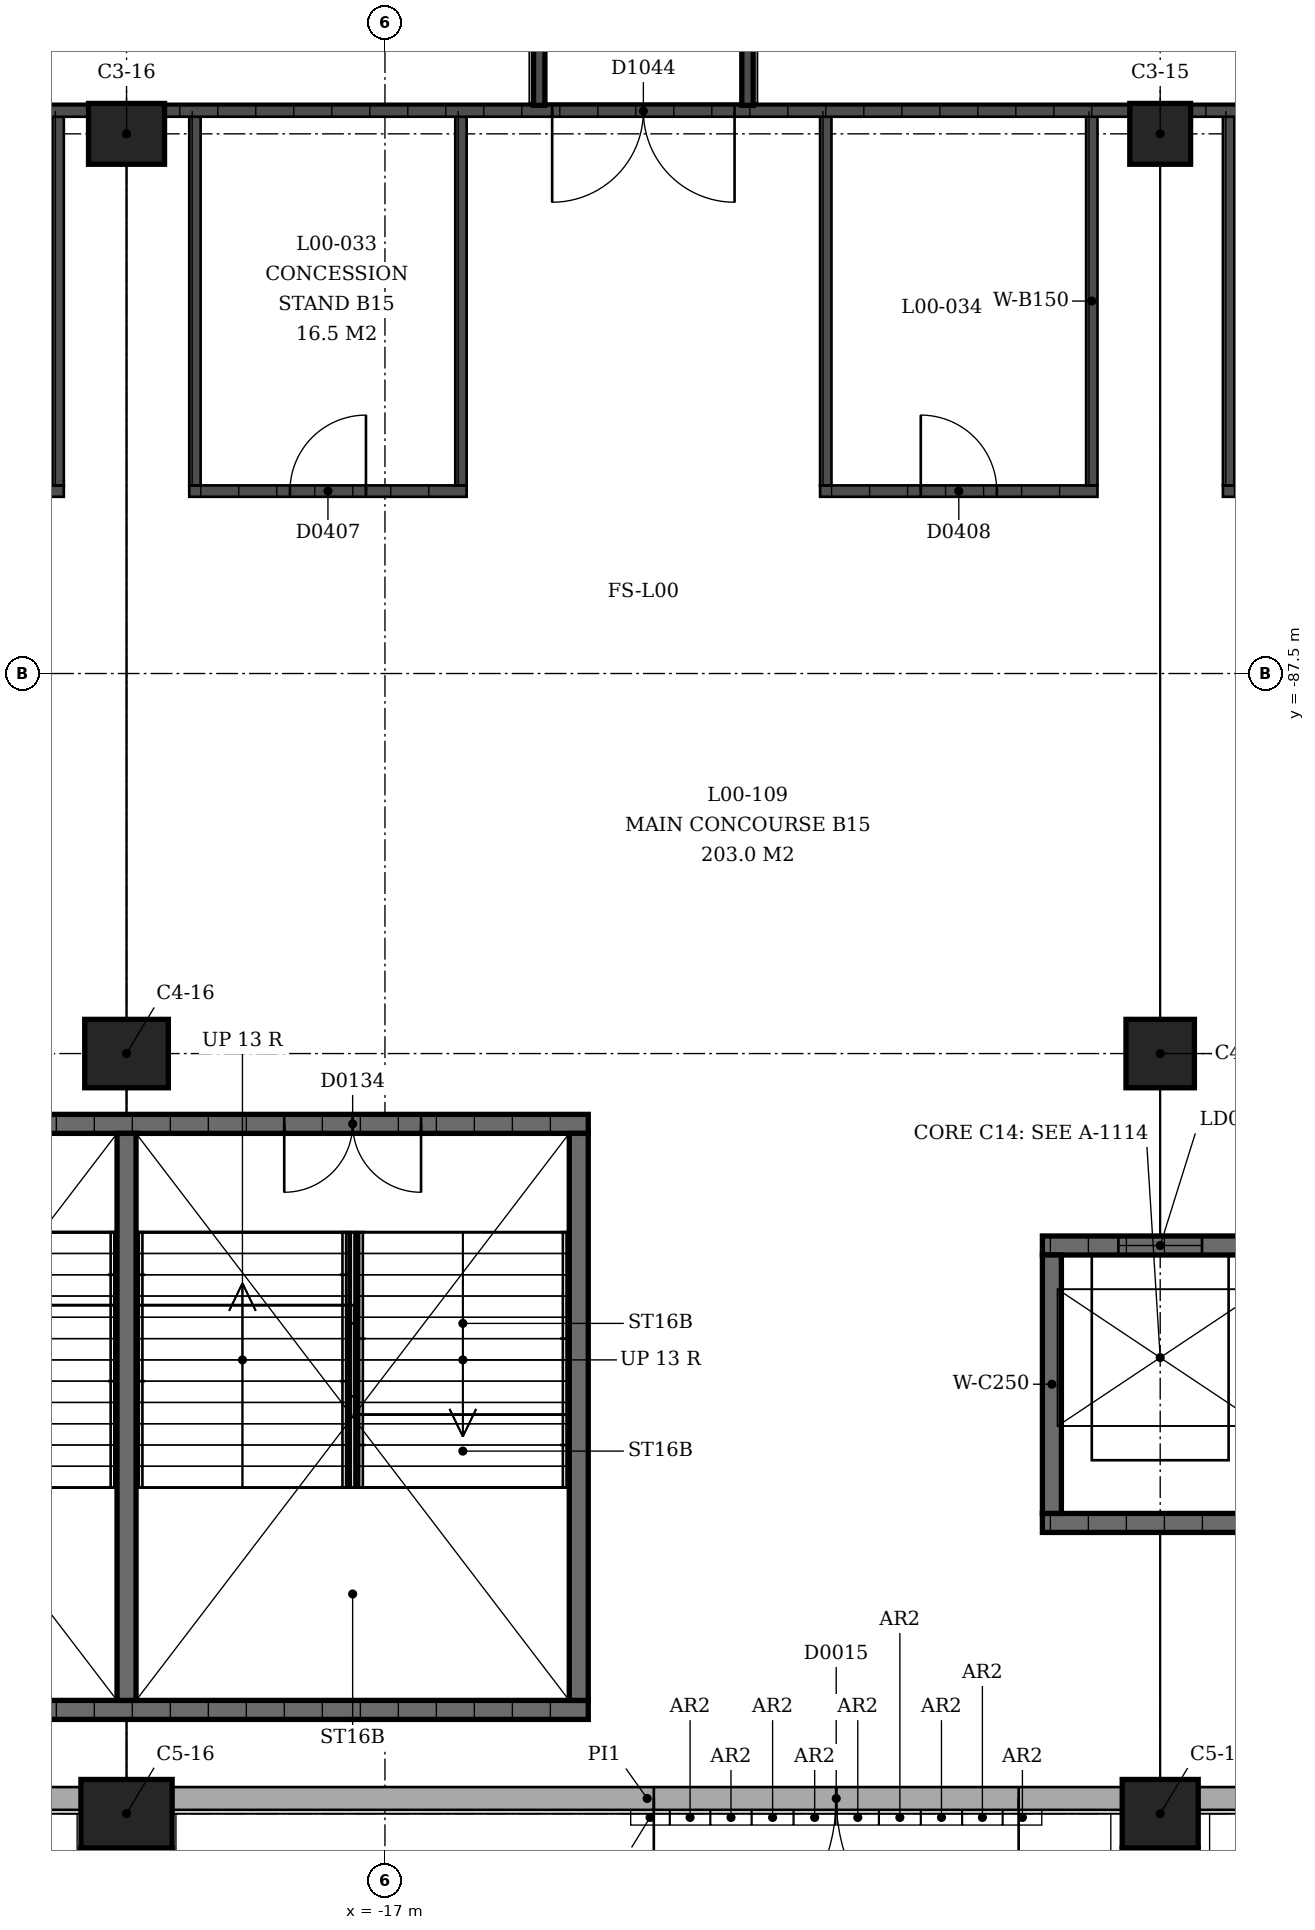
"""IFC4 building model, lengths in metres.
Left out: names, types, materials, properties, quantities, classifications, styles, units other than length and angle.
Written with IfcOpenShell. Run it as: python <this file> out.ifc"""

import sys

from ifc_helpers import new_model, si_unit, direction, frame, frame_2d, origin, origin_2d, place, context, subcontext, project, spatial, rectangle, extrude, element, fill, save


model = new_model("IFC4")
c1 = context("Model", 3, precision=1e-05, world=origin(), true_north=direction((0.0, 1.0)))
c2 = subcontext(c1, "Body", "Model", "MODEL_VIEW")
j1 = project(units=[si_unit("LENGTHUNIT", "METRE"), si_unit("PLANEANGLEUNIT", "RADIAN")], contexts=[c1])
p1 = place(None, origin())
s1 = spatial("IfcSite", under=j1, at=p1, CompositionType="ELEMENT")
p2 = place(p1, origin())
s2 = spatial("IfcBuilding", under=s1, at=p2, CompositionType="ELEMENT")
p3 = place(p2, origin())
s3 = spatial("IfcBuildingStorey", under=s2, at=p3, CompositionType="ELEMENT", Elevation=0.0)
p4 = place(p3, frame((-6.8, -80.4, 0.0), z_axis=(0.0, 0.0, 1.0), x_axis=(1.0, 0.0, 0.0)))
e1 = element("IfcColumn", 1, at=p4, inside=s3, PredefinedType="COLUMN", context=c2, shape_type="SweptSolid", body=[
    extrude(rectangle(XDim=0.8, YDim=0.8, at=origin_2d()), origin(), (0.0, 0.0, 1.0), 4.5),
])
p5 = place(p3, frame((-6.8, -92.5, 0.0), z_axis=(0.0, 0.0, 1.0), x_axis=(1.0, 0.0, 0.0)))
e2 = element("IfcColumn", 2, at=p5, inside=s3, PredefinedType="COLUMN", context=c2, shape_type="SweptSolid", body=[
    extrude(rectangle(XDim=0.9, YDim=0.9, at=origin_2d()), origin(), (0.0, 0.0, 1.0), 4.5),
])
p6 = place(p3, frame((-6.8, -102.5, 0.0), z_axis=(0.0, 0.0, 1.0), x_axis=(1.0, 0.0, 0.0)))
e3 = element("IfcColumn", 3, at=p6, inside=s3, PredefinedType="COLUMN", context=c2, shape_type="SweptSolid", body=[
    extrude(rectangle(XDim=1.0, YDim=0.9, at=origin_2d()), origin(), (0.0, 0.0, 1.0), 4.5),
])
p7 = place(p3, frame((-20.4, -80.4, 0.0), z_axis=(0.0, 0.0, 1.0), x_axis=(1.0, 0.0, 0.0)))
e4 = element("IfcColumn", 4, at=p7, inside=s3, PredefinedType="COLUMN", context=c2, shape_type="SweptSolid", body=[
    extrude(rectangle(XDim=1.0, YDim=0.8, at=origin_2d()), origin(), (0.0, 0.0, 1.0), 4.5),
])
p8 = place(p3, frame((-20.4, -92.5, 0.0), z_axis=(0.0, 0.0, 1.0), x_axis=(1.0, 0.0, 0.0)))
e5 = element("IfcColumn", 5, at=p8, inside=s3, PredefinedType="COLUMN", context=c2, shape_type="SweptSolid", body=[
    extrude(rectangle(XDim=1.1, YDim=0.9, at=origin_2d()), origin(), (0.0, 0.0, 1.0), 4.5),
])
p9 = place(p3, frame((-20.4, -102.5, 0.0), z_axis=(0.0, 0.0, 1.0), x_axis=(1.0, 0.0, 0.0)))
e6 = element("IfcColumn", 6, at=p9, inside=s3, PredefinedType="COLUMN", context=c2, shape_type="SweptSolid", body=[
    extrude(rectangle(XDim=1.2, YDim=0.9, at=origin_2d()), origin(), (0.0, 0.0, 1.0), 4.5),
])
p10 = place(p3, frame((6.2, -102.3, 0.0), z_axis=(0.0, 0.0, 1.0), x_axis=(-1.0, 0.0, 0.0)))
e7 = element("IfcWall", 7, at=p10, inside=s3, PredefinedType="SOLIDWALL", context=c2, shape_type="SweptSolid", body=[
    extrude(rectangle(XDim=12.5, YDim=0.3, at=frame_2d((6.25, 0.0))), origin(), (0.0, 0.0, 1.0), 3.09),
])
p11 = place(p10, frame((7.238, 0.0, 0.0)))
e8 = element("IfcOpeningElement", 8, at=p11, cuts=e7, PredefinedType="OPENING", context=c2, shape_type="SweptSolid", body=[
    extrude(rectangle(XDim=3.0, YDim=2.4, at=frame_2d((1.5, 1.2))), frame((0.0, 0.16, 0.0), z_axis=(0.0, -1.0, 0.0), x_axis=(1.0, 0.0, 0.0)), (0.0, 0.0, 1.0), 0.32),
])
p12 = place(p3, frame((-7.3, -102.3, 0.0), z_axis=(0.0, 0.0, 1.0), x_axis=(-1.0, 0.0, 0.0)))
e9 = element("IfcWall", 9, at=p12, inside=s3, PredefinedType="SOLIDWALL", context=c2, shape_type="SweptSolid", body=[
    extrude(rectangle(XDim=12.5, YDim=0.3, at=frame_2d((6.25, 0.0))), origin(), (0.0, 0.0, 1.0), 3.09),
])
p13 = place(p12, frame((1.363, 0.0, 0.0)))
e10 = element("IfcOpeningElement", 10, at=p13, cuts=e9, PredefinedType="OPENING", context=c2, shape_type="SweptSolid", body=[
    extrude(rectangle(XDim=4.8, YDim=2.4, at=frame_2d((2.4, 1.2))), frame((0.0, 0.16, 0.0), z_axis=(0.0, -1.0, 0.0), x_axis=(1.0, 0.0, 0.0)), (0.0, 0.0, 1.0), 0.32),
])
p14 = place(p3, frame((-21.0, -102.3, 0.0), z_axis=(0.0, 0.0, 1.0), x_axis=(-1.0, 0.0, 0.0)))
e11 = element("IfcWall", 11, at=p14, inside=s3, PredefinedType="SOLIDWALL", context=c2, shape_type="SweptSolid", body=[
    extrude(rectangle(XDim=12.5, YDim=0.3, at=frame_2d((6.25, 0.0))), origin(), (0.0, 0.0, 1.0), 3.09),
])
p15 = place(p14, frame((7.238, 0.0, 0.0)))
e12 = element("IfcOpeningElement", 12, at=p15, cuts=e11, PredefinedType="OPENING", context=c2, shape_type="SweptSolid", body=[
    extrude(rectangle(XDim=3.0, YDim=2.4, at=frame_2d((1.5, 1.2))), frame((0.0, 0.16, 0.0), z_axis=(0.0, -1.0, 0.0), x_axis=(1.0, 0.0, 0.0)), (0.0, 0.0, 1.0), 0.32),
])
p16 = place(p3, frame((-26.475, -93.425, 0.0), z_axis=(0.0, 0.0, 1.0), x_axis=(1.0, 0.0, 0.0)))
e13 = element("IfcWall", 13, at=p16, inside=s3, PredefinedType="SHEAR", context=c2, shape_type="SweptSolid", body=[
    extrude(rectangle(XDim=12.15, YDim=0.25, at=frame_2d((6.075, 0.0))), origin(), (0.0, 0.0, 1.0), 4.09),
])
p17 = place(p16, frame((2.2, 0.0, 0.0)))
e14 = element("IfcOpeningElement", 14, at=p17, cuts=e13, PredefinedType="OPENING", context=c2, shape_type="SweptSolid", body=[
    extrude(rectangle(XDim=1.8, YDim=2.1, at=frame_2d((0.9, 1.05))), frame((0.0, 0.125, 0.0), z_axis=(0.0, -1.0, 0.0), x_axis=(1.0, 0.0, 0.0)), (0.0, 0.0, 1.0), 0.25),
])
p18 = place(p16, frame((8.15, 0.0, 0.0)))
e15 = element("IfcOpeningElement", 15, at=p18, cuts=e13, PredefinedType="OPENING", context=c2, shape_type="SweptSolid", body=[
    extrude(rectangle(XDim=1.8, YDim=2.1, at=frame_2d((0.9, 1.05))), frame((0.0, 0.125, 0.0), z_axis=(0.0, -1.0, 0.0), x_axis=(1.0, 0.0, 0.0)), (0.0, 0.0, 1.0), 0.25),
])
p19 = place(p3, frame((-26.475, -101.135, 0.0), z_axis=(0.0, 0.0, 1.0), x_axis=(1.0, 0.0, 0.0)))
e16 = element("IfcWall", 16, at=p19, inside=s3, PredefinedType="SHEAR", context=c2, shape_type="SweptSolid", body=[
    extrude(rectangle(XDim=12.15, YDim=0.25, at=frame_2d((6.075, 0.0))), origin(), (0.0, 0.0, 1.0), 4.09),
])
for number, where, z_axis, x_axis in (
    (17, (-14.45, -93.55, 0.0), (0.0, 0.0, 1.0), (0.0, -1.0, 0.0)),
    (18, (-20.4, -93.55, 0.0), (0.0, 0.0, 1.0), (0.0, -1.0, 0.0)),
):
    element("IfcWall", number, at=place(p3, frame(where, z_axis=z_axis, x_axis=x_axis)), inside=s3, PredefinedType="SHEAR", context=c2, shape_type="SweptSolid", body=[
        extrude(rectangle(XDim=7.46, YDim=0.25, at=frame_2d((3.73, 0.0))), origin(), (0.0, 0.0, 1.0), 4.09),
    ])
p20 = place(p3, frame((-8.35, -95.025, 0.0), z_axis=(0.0, 0.0, 1.0), x_axis=(1.0, 0.0, 0.0)))
e19 = element("IfcWall", 19, at=p20, inside=s3, PredefinedType="SHEAR", context=c2, shape_type="SweptSolid", body=[
    extrude(rectangle(XDim=3.1, YDim=0.25, at=frame_2d((1.55, 0.0))), origin(), (0.0, 0.0, 1.0), 4.09),
])
p21 = place(p20, frame((1.0, 0.0, 0.0)))
e20 = element("IfcOpeningElement", 20, at=p21, cuts=e19, PredefinedType="OPENING", context=c2, shape_type="SweptSolid", body=[
    extrude(rectangle(XDim=1.1, YDim=2.1, at=frame_2d((0.55, 1.05))), frame((0.0, 0.125, 0.0), z_axis=(0.0, -1.0, 0.0), x_axis=(1.0, 0.0, 0.0)), (0.0, 0.0, 1.0), 0.25),
])
p22 = place(p3, frame((-8.35, -98.675, 0.0), z_axis=(0.0, 0.0, 1.0), x_axis=(1.0, 0.0, 0.0)))
e21 = element("IfcWall", 21, at=p22, inside=s3, PredefinedType="SHEAR", context=c2, shape_type="SweptSolid", body=[
    extrude(rectangle(XDim=3.1, YDim=0.25, at=frame_2d((1.55, 0.0))), origin(), (0.0, 0.0, 1.0), 4.09),
])
p23 = place(p3, frame((-8.225, -95.15, 0.0), z_axis=(0.0, 0.0, 1.0), x_axis=(0.0, -1.0, 0.0)))
e22 = element("IfcWall", 22, at=p23, inside=s3, PredefinedType="SHEAR", context=c2, shape_type="SweptSolid", body=[
    extrude(rectangle(XDim=3.4, YDim=0.25, at=frame_2d((1.7, 0.0))), origin(), (0.0, 0.0, 1.0), 4.09),
])
p24 = place(p3, frame((-2.325, -85.1, 0.0), z_axis=(0.0, 0.0, 1.0), x_axis=(-1.0, 0.0, 0.0)))
e23 = element("IfcWall", 23, at=p24, inside=s3, PredefinedType="SOLIDWALL", context=c2, shape_type="SweptSolid", body=[
    extrude(rectangle(XDim=3.65, YDim=0.15, at=frame_2d((1.825, 0.0))), origin(), (0.0, 0.0, 1.0), 3.0),
])
p25 = place(p24, frame((1.325, 0.0, 0.0)))
e24 = element("IfcOpeningElement", 24, at=p25, cuts=e23, PredefinedType="OPENING", context=c2, shape_type="SweptSolid", body=[
    extrude(rectangle(XDim=1.0, YDim=2.1, at=frame_2d((0.5, 1.05))), frame((0.0, 0.075, 0.0), z_axis=(0.0, -1.0, 0.0), x_axis=(1.0, 0.0, 0.0)), (0.0, 0.0, 1.0), 0.15),
])
p26 = place(p3, frame((-5.9, -80.1, 0.0), z_axis=(0.0, 0.0, 1.0), x_axis=(0.0, -1.0, 0.0)))
e25 = element("IfcWall", 25, at=p26, inside=s3, PredefinedType="SOLIDWALL", context=c2, shape_type="SweptSolid", body=[
    extrude(rectangle(XDim=4.925, YDim=0.15, at=frame_2d((2.462, 0.0))), origin(), (0.0, 0.0, 1.0), 3.0),
])
p27 = place(p3, frame((-19.575, -85.1, 0.0), z_axis=(0.0, 0.0, 1.0), x_axis=(1.0, 0.0, 0.0)))
e26 = element("IfcWall", 26, at=p27, inside=s3, PredefinedType="SOLIDWALL", context=c2, shape_type="SweptSolid", body=[
    extrude(rectangle(XDim=3.65, YDim=0.15, at=frame_2d((1.825, 0.0))), origin(), (0.0, 0.0, 1.0), 3.0),
])
p28 = place(p27, frame((1.325, 0.0, 0.0)))
e27 = element("IfcOpeningElement", 27, at=p28, cuts=e26, PredefinedType="OPENING", context=c2, shape_type="SweptSolid", body=[
    extrude(rectangle(XDim=1.0, YDim=2.1, at=frame_2d((0.5, 1.05))), frame((0.0, 0.075, 0.0), z_axis=(0.0, -1.0, 0.0), x_axis=(1.0, 0.0, 0.0)), (0.0, 0.0, 1.0), 0.15),
])
for number, where, z_axis, x_axis in (
    (28, (-19.5, -80.1, 0.0), (0.0, 0.0, 1.0), (0.0, -1.0, 0.0)),
    (29, (-16.0, -80.1, 0.0), (0.0, 0.0, 1.0), (0.0, -1.0, 0.0)),
):
    element("IfcWall", number, at=place(p3, frame(where, z_axis=z_axis, x_axis=x_axis)), inside=s3, PredefinedType="SOLIDWALL", context=c2, shape_type="SweptSolid", body=[
        extrude(rectangle(XDim=4.925, YDim=0.15, at=frame_2d((2.462, 0.0))), origin(), (0.0, 0.0, 1.0), 3.0),
    ])
p29 = place(p3, frame((-11.275, -85.1, 0.0), z_axis=(0.0, 0.0, 1.0), x_axis=(1.0, 0.0, 0.0)))
e30 = element("IfcWall", 30, at=p29, inside=s3, PredefinedType="SOLIDWALL", context=c2, shape_type="SweptSolid", body=[
    extrude(rectangle(XDim=3.65, YDim=0.15, at=frame_2d((1.825, 0.0))), origin(), (0.0, 0.0, 1.0), 3.0),
])
p30 = place(p29, frame((1.325, 0.0, 0.0)))
e31 = element("IfcOpeningElement", 31, at=p30, cuts=e30, PredefinedType="OPENING", context=c2, shape_type="SweptSolid", body=[
    extrude(rectangle(XDim=1.0, YDim=2.1, at=frame_2d((0.5, 1.05))), frame((0.0, 0.075, 0.0), z_axis=(0.0, -1.0, 0.0), x_axis=(1.0, 0.0, 0.0)), (0.0, 0.0, 1.0), 0.15),
])
for number, where, z_axis, x_axis in (
    (32, (-11.2, -80.1, 0.0), (0.0, 0.0, 1.0), (0.0, -1.0, 0.0)),
    (33, (-7.7, -80.1, 0.0), (0.0, 0.0, 1.0), (0.0, -1.0, 0.0)),
):
    element("IfcWall", number, at=place(p3, frame(where, z_axis=z_axis, x_axis=x_axis)), inside=s3, PredefinedType="SOLIDWALL", context=c2, shape_type="SweptSolid", body=[
        extrude(rectangle(XDim=4.925, YDim=0.15, at=frame_2d((2.462, 0.0))), origin(), (0.0, 0.0, 1.0), 3.0),
    ])
p31 = place(p3, frame((-21.225, -85.1, 0.0), z_axis=(0.0, 0.0, 1.0), x_axis=(-1.0, 0.0, 0.0)))
e34 = element("IfcWall", 34, at=p31, inside=s3, PredefinedType="SOLIDWALL", context=c2, shape_type="SweptSolid", body=[
    extrude(rectangle(XDim=3.65, YDim=0.15, at=frame_2d((1.825, 0.0))), origin(), (0.0, 0.0, 1.0), 3.0),
])
p32 = place(p31, frame((1.325, 0.0, 0.0)))
e35 = element("IfcOpeningElement", 35, at=p32, cuts=e34, PredefinedType="OPENING", context=c2, shape_type="SweptSolid", body=[
    extrude(rectangle(XDim=1.0, YDim=2.1, at=frame_2d((0.5, 1.05))), frame((0.0, 0.075, 0.0), z_axis=(0.0, -1.0, 0.0), x_axis=(1.0, 0.0, 0.0)), (0.0, 0.0, 1.0), 0.15),
])
p33 = place(p3, frame((-21.3, -80.1, 0.0), z_axis=(0.0, 0.0, 1.0), x_axis=(0.0, -1.0, 0.0)))
e36 = element("IfcWall", 36, at=p33, inside=s3, PredefinedType="SOLIDWALL", context=c2, shape_type="SweptSolid", body=[
    extrude(rectangle(XDim=4.925, YDim=0.15, at=frame_2d((2.462, 0.0))), origin(), (0.0, 0.0, 1.0), 3.0),
])
p34 = place(p3, frame((6.3, -80.1, 0.0), z_axis=(0.0, 0.0, 1.0), x_axis=(-1.0, 0.0, 0.0)))
e37 = element("IfcWall", 37, at=p34, inside=s3, PredefinedType="SOLIDWALL", context=c2, shape_type="SweptSolid", body=[
    extrude(rectangle(XDim=12.7, YDim=0.15, at=frame_2d((6.35, 0.0))), origin(), (0.0, 0.0, 1.0), 3.0),
])
p35 = place(p3, frame((-7.2, -80.1, 0.0), z_axis=(0.0, 0.0, 1.0), x_axis=(-1.0, 0.0, 0.0)))
e38 = element("IfcWall", 38, at=p35, inside=s3, PredefinedType="SOLIDWALL", context=c2, shape_type="SweptSolid", body=[
    extrude(rectangle(XDim=12.7, YDim=0.15, at=frame_2d((6.35, 0.0))), origin(), (0.0, 0.0, 1.0), 3.0),
])
p36 = place(p35, frame((5.2, 0.0, 0.0)))
e39 = element("IfcOpeningElement", 39, at=p36, cuts=e38, PredefinedType="OPENING", context=c2, shape_type="SweptSolid", body=[
    extrude(rectangle(XDim=2.4, YDim=2.4, at=frame_2d((1.2, 1.2))), frame((0.0, 0.075, 0.0), z_axis=(0.0, -1.0, 0.0), x_axis=(1.0, 0.0, 0.0)), (0.0, 0.0, 1.0), 0.15),
])
p37 = place(p3, frame((-20.9, -80.1, 0.0), z_axis=(0.0, 0.0, 1.0), x_axis=(-1.0, 0.0, 0.0)))
e40 = element("IfcWall", 40, at=p37, inside=s3, PredefinedType="SOLIDWALL", context=c2, shape_type="SweptSolid", body=[
    extrude(rectangle(XDim=12.7, YDim=0.15, at=frame_2d((6.35, 0.0))), origin(), (0.0, 0.0, 1.0), 3.0),
])
for number, where, z_axis, x_axis in (
    (41, (-14.97, -75.3, 0.0), (0.0, 0.0, 1.0), (0.0, -1.0, 0.0)),
    (42, (-12.23, -75.3, 0.0), (0.0, 0.0, 1.0), (0.0, -1.0, 0.0)),
):
    element("IfcWall", number, at=place(p3, frame(where, z_axis=z_axis, x_axis=x_axis)), inside=s3, PredefinedType="SOLIDWALL", context=c2, shape_type="SweptSolid", body=[
        extrude(rectangle(XDim=4.725, YDim=0.15, at=frame_2d((2.362, 0.0))), origin(), (0.0, 0.0, 1.0), 2.75),
    ])
p38 = place(p13, origin())
e43 = element("IfcDoor", 43, at=p38, inside=s3, OperationType="DOUBLE_DOOR_SINGLE_SWING", PredefinedType="DOOR", context=c2, shape_type="SweptSolid", body=[
    extrude(rectangle(XDim=4.8, YDim=2.4, at=frame_2d((2.4, 1.2))), frame((0.0, 0.025, 0.0), z_axis=(0.0, -1.0, 0.0), x_axis=(1.0, 0.0, 0.0)), (0.0, 0.0, 1.0), 0.05),
])
fill(e10, e43)
p39 = place(p18, origin())
e44 = element("IfcDoor", 44, at=p39, inside=s3, OperationType="DOUBLE_DOOR_SINGLE_SWING", PredefinedType="DOOR", context=c2, shape_type="SweptSolid", body=[
    extrude(rectangle(XDim=1.8, YDim=2.1, at=frame_2d((0.9, 1.05))), frame((0.0, 0.025, 0.0), z_axis=(0.0, -1.0, 0.0), x_axis=(1.0, 0.0, 0.0)), (0.0, 0.0, 1.0), 0.05),
])
fill(e15, e44)
p40 = place(p21, origin())
e45 = element("IfcDoor", 45, at=p40, inside=s3, OperationType="SLIDING_TO_LEFT", PredefinedType="DOOR", context=c2, shape_type="SweptSolid", body=[
    extrude(rectangle(XDim=1.1, YDim=2.1, at=frame_2d((0.55, 1.05))), frame((0.0, 0.025, 0.0), z_axis=(0.0, -1.0, 0.0), x_axis=(1.0, 0.0, 0.0)), (0.0, 0.0, 1.0), 0.05),
])
fill(e20, e45)
p41 = place(p28, origin())
e46 = element("IfcDoor", 46, at=p41, inside=s3, OperationType="SINGLE_SWING_LEFT", PredefinedType="DOOR", context=c2, shape_type="SweptSolid", body=[
    extrude(rectangle(XDim=1.0, YDim=2.1, at=frame_2d((0.5, 1.05))), frame((0.0, 0.025, 0.0), z_axis=(0.0, -1.0, 0.0), x_axis=(1.0, 0.0, 0.0)), (0.0, 0.0, 1.0), 0.05),
])
fill(e27, e46)
p42 = place(p30, origin())
e47 = element("IfcDoor", 47, at=p42, inside=s3, OperationType="SINGLE_SWING_RIGHT", PredefinedType="DOOR", context=c2, shape_type="SweptSolid", body=[
    extrude(rectangle(XDim=1.0, YDim=2.1, at=frame_2d((0.5, 1.05))), frame((0.0, 0.025, 0.0), z_axis=(0.0, -1.0, 0.0), x_axis=(1.0, 0.0, 0.0)), (0.0, 0.0, 1.0), 0.05),
])
fill(e31, e47)
p43 = place(p36, origin())
e48 = element("IfcDoor", 48, at=p43, inside=s3, OperationType="DOUBLE_DOOR_SINGLE_SWING", PredefinedType="DOOR", context=c2, shape_type="SweptSolid", body=[
    extrude(rectangle(XDim=2.4, YDim=2.4, at=frame_2d((1.2, 1.2))), frame((0.0, 0.025, 0.0), z_axis=(0.0, -1.0, 0.0), x_axis=(1.0, 0.0, 0.0)), (0.0, 0.0, 1.0), 0.05),
])
fill(e39, e48)
save(model, sys.argv[1])
